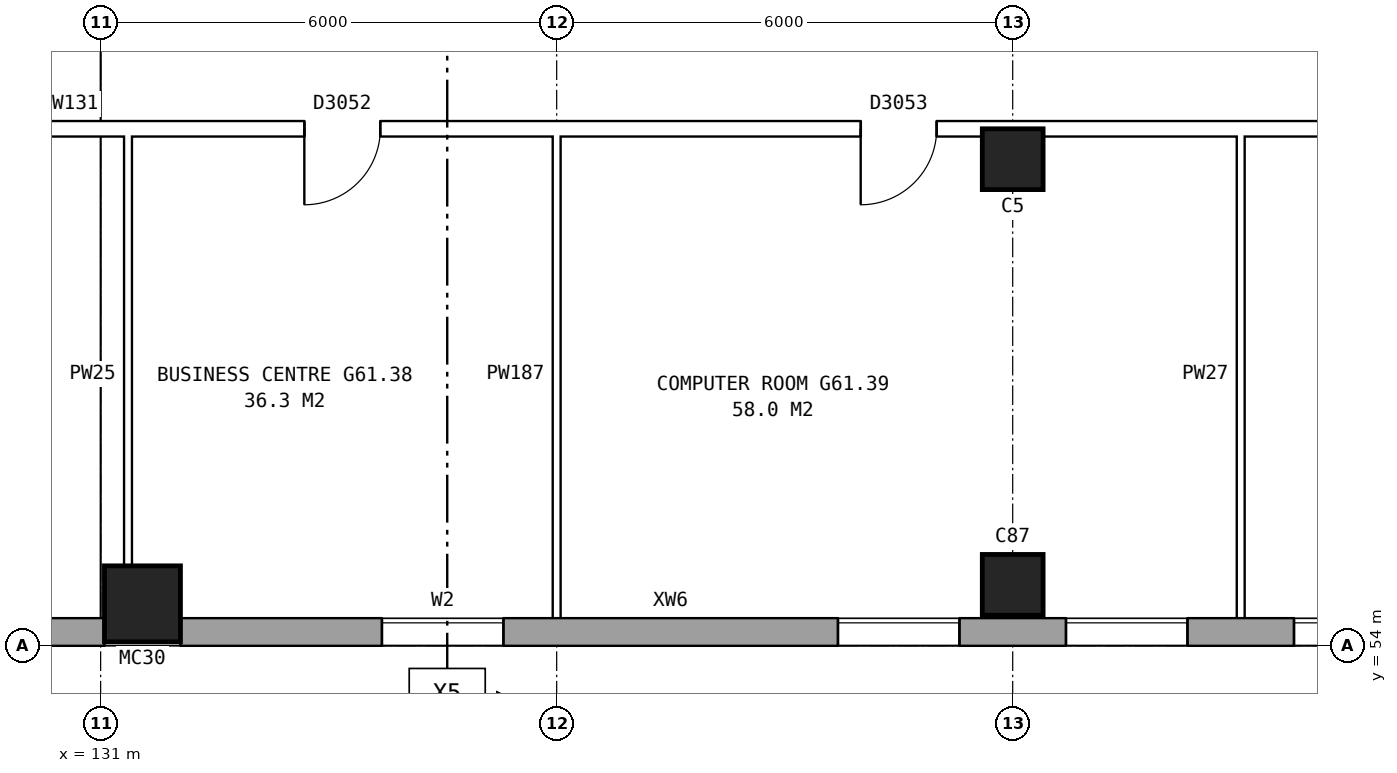
"""IFC4 building model, lengths in metres.
Left out: names, types, materials, properties, quantities, classifications, styles, units other than length and angle.
Written with IfcOpenShell. Run it as: python <this file> out.ifc"""

import sys

from ifc_helpers import new_model, si_unit, direction, frame, frame_2d, origin, origin_2d, place, context, subcontext, project, spatial, rectangle, hollow_rectangle, extrude, element, fill, save


model = new_model("IFC4")
c1 = context("Model", 3, precision=1e-05, world=origin(), true_north=direction((0.0, 1.0)))
c2 = subcontext(c1, "Body", "Model", "MODEL_VIEW")
j1 = project(units=[si_unit("LENGTHUNIT", "METRE"), si_unit("PLANEANGLEUNIT", "RADIAN")], contexts=[c1])
p1 = place(None, origin())
s1 = spatial("IfcSite", under=j1, at=p1, CompositionType="ELEMENT")
p2 = place(p1, origin())
s2 = spatial("IfcBuilding", under=s1, at=p2, CompositionType="ELEMENT")
p3 = place(p2, frame((0.0, 0.0, 215.2)))
s3 = spatial("IfcBuildingStorey", under=s2, at=p3, CompositionType="ELEMENT", Elevation=215.2)
for number, where, z_axis, x_axis in (
    (1, (143.0, 54.8, 0.0), (0.0, 0.0, 1.0), (1.0, 0.0, 0.0)),
    (2, (143.0, 60.4, 0.0), (0.0, 0.0, 1.0), (1.0, 0.0, 0.0)),
):
    element("IfcColumn", number, at=place(p3, frame(where, z_axis=z_axis, x_axis=x_axis)), inside=s3, PredefinedType="COLUMN", context=c2, shape_type="SweptSolid", body=[
        extrude(rectangle(XDim=0.8, YDim=0.8, at=origin_2d()), origin(), (0.0, 0.0, 1.0), 5.6),
    ])
p4 = place(p3, frame((131.55, 54.55, 0.0), z_axis=(0.0, 0.0, 1.0), x_axis=(1.0, 0.0, 0.0)))
e3 = element("IfcColumn", 3, at=p4, inside=s3, PredefinedType="COLUMN", context=c2, shape_type="SweptSolid", body=[
    extrude(hollow_rectangle(XDim=1.0, YDim=1.0, WallThickness=0.055, at=origin_2d()), origin(), (0.0, 0.0, 1.0), 6.2),
])
p5 = place(p3, frame((75.95, 54.18, 0.0), z_axis=(0.0, 0.0, 1.0), x_axis=(1.0, 0.0, 0.0)))
e4 = element("IfcWall", 4, at=p5, inside=s3, PredefinedType="STANDARD", context=c2, shape_type="SweptSolid", body=[
    extrude(rectangle(XDim=55.1, YDim=0.36, at=frame_2d((27.55, 0.0))), origin(), (0.0, 0.0, 1.0), 5.6),
])
p6 = place(p5, frame((0.969, 0.0, 0.15)))
e5 = element("IfcOpeningElement", 5, at=p6, cuts=e4, PredefinedType="OPENING", context=c2, shape_type="SweptSolid", body=[
    extrude(rectangle(XDim=1.6, YDim=2.4, at=frame_2d((0.8, 1.2))), frame((0.0, 0.19, 0.0), z_axis=(0.0, -1.0, 0.0), x_axis=(1.0, 0.0, 0.0)), (0.0, 0.0, 1.0), 0.38),
])
p7 = place(p5, frame((4.406, 0.0, 0.15)))
e6 = element("IfcOpeningElement", 6, at=p7, cuts=e4, PredefinedType="OPENING", context=c2, shape_type="SweptSolid", body=[
    extrude(rectangle(XDim=1.6, YDim=2.4, at=frame_2d((0.8, 1.2))), frame((0.0, 0.19, 0.0), z_axis=(0.0, -1.0, 0.0), x_axis=(1.0, 0.0, 0.0)), (0.0, 0.0, 1.0), 0.38),
])
p8 = place(p5, frame((7.844, 0.0, 0.15)))
e7 = element("IfcOpeningElement", 7, at=p8, cuts=e4, PredefinedType="OPENING", context=c2, shape_type="SweptSolid", body=[
    extrude(rectangle(XDim=1.6, YDim=2.4, at=frame_2d((0.8, 1.2))), frame((0.0, 0.19, 0.0), z_axis=(0.0, -1.0, 0.0), x_axis=(1.0, 0.0, 0.0)), (0.0, 0.0, 1.0), 0.38),
])
p9 = place(p5, frame((11.281, 0.0, 0.15)))
e8 = element("IfcOpeningElement", 8, at=p9, cuts=e4, PredefinedType="OPENING", context=c2, shape_type="SweptSolid", body=[
    extrude(rectangle(XDim=1.6, YDim=2.4, at=frame_2d((0.8, 1.2))), frame((0.0, 0.19, 0.0), z_axis=(0.0, -1.0, 0.0), x_axis=(1.0, 0.0, 0.0)), (0.0, 0.0, 1.0), 0.38),
])
p10 = place(p5, frame((14.719, 0.0, 0.15)))
e9 = element("IfcOpeningElement", 9, at=p10, cuts=e4, PredefinedType="OPENING", context=c2, shape_type="SweptSolid", body=[
    extrude(rectangle(XDim=1.6, YDim=2.4, at=frame_2d((0.8, 1.2))), frame((0.0, 0.19, 0.0), z_axis=(0.0, -1.0, 0.0), x_axis=(1.0, 0.0, 0.0)), (0.0, 0.0, 1.0), 0.38),
])
p11 = place(p5, frame((18.156, 0.0, 0.15)))
e10 = element("IfcOpeningElement", 10, at=p11, cuts=e4, PredefinedType="OPENING", context=c2, shape_type="SweptSolid", body=[
    extrude(rectangle(XDim=1.6, YDim=2.4, at=frame_2d((0.8, 1.2))), frame((0.0, 0.19, 0.0), z_axis=(0.0, -1.0, 0.0), x_axis=(1.0, 0.0, 0.0)), (0.0, 0.0, 1.0), 0.38),
])
p12 = place(p5, frame((21.594, 0.0, 0.15)))
e11 = element("IfcOpeningElement", 11, at=p12, cuts=e4, PredefinedType="OPENING", context=c2, shape_type="SweptSolid", body=[
    extrude(rectangle(XDim=1.6, YDim=2.4, at=frame_2d((0.8, 1.2))), frame((0.0, 0.19, 0.0), z_axis=(0.0, -1.0, 0.0), x_axis=(1.0, 0.0, 0.0)), (0.0, 0.0, 1.0), 0.38),
])
p13 = place(p5, frame((25.031, 0.0, 0.15)))
e12 = element("IfcOpeningElement", 12, at=p13, cuts=e4, PredefinedType="OPENING", context=c2, shape_type="SweptSolid", body=[
    extrude(rectangle(XDim=1.6, YDim=2.4, at=frame_2d((0.8, 1.2))), frame((0.0, 0.19, 0.0), z_axis=(0.0, -1.0, 0.0), x_axis=(1.0, 0.0, 0.0)), (0.0, 0.0, 1.0), 0.38),
])
p14 = place(p5, frame((28.469, 0.0, 0.15)))
e13 = element("IfcOpeningElement", 13, at=p14, cuts=e4, PredefinedType="OPENING", context=c2, shape_type="SweptSolid", body=[
    extrude(rectangle(XDim=1.6, YDim=2.4, at=frame_2d((0.8, 1.2))), frame((0.0, 0.19, 0.0), z_axis=(0.0, -1.0, 0.0), x_axis=(1.0, 0.0, 0.0)), (0.0, 0.0, 1.0), 0.38),
])
p15 = place(p5, frame((31.906, 0.0, 0.15)))
e14 = element("IfcOpeningElement", 14, at=p15, cuts=e4, PredefinedType="OPENING", context=c2, shape_type="SweptSolid", body=[
    extrude(rectangle(XDim=1.6, YDim=2.4, at=frame_2d((0.8, 1.2))), frame((0.0, 0.19, 0.0), z_axis=(0.0, -1.0, 0.0), x_axis=(1.0, 0.0, 0.0)), (0.0, 0.0, 1.0), 0.38),
])
p16 = place(p5, frame((35.344, 0.0, 0.15)))
e15 = element("IfcOpeningElement", 15, at=p16, cuts=e4, PredefinedType="OPENING", context=c2, shape_type="SweptSolid", body=[
    extrude(rectangle(XDim=1.6, YDim=2.4, at=frame_2d((0.8, 1.2))), frame((0.0, 0.19, 0.0), z_axis=(0.0, -1.0, 0.0), x_axis=(1.0, 0.0, 0.0)), (0.0, 0.0, 1.0), 0.38),
])
p17 = place(p5, frame((38.781, 0.0, 0.15)))
e16 = element("IfcOpeningElement", 16, at=p17, cuts=e4, PredefinedType="OPENING", context=c2, shape_type="SweptSolid", body=[
    extrude(rectangle(XDim=1.6, YDim=2.4, at=frame_2d((0.8, 1.2))), frame((0.0, 0.19, 0.0), z_axis=(0.0, -1.0, 0.0), x_axis=(1.0, 0.0, 0.0)), (0.0, 0.0, 1.0), 0.38),
])
p18 = place(p5, frame((42.219, 0.0, 0.15)))
e17 = element("IfcOpeningElement", 17, at=p18, cuts=e4, PredefinedType="OPENING", context=c2, shape_type="SweptSolid", body=[
    extrude(rectangle(XDim=1.6, YDim=2.4, at=frame_2d((0.8, 1.2))), frame((0.0, 0.19, 0.0), z_axis=(0.0, -1.0, 0.0), x_axis=(1.0, 0.0, 0.0)), (0.0, 0.0, 1.0), 0.38),
])
p19 = place(p5, frame((45.656, 0.0, 0.15)))
e18 = element("IfcOpeningElement", 18, at=p19, cuts=e4, PredefinedType="OPENING", context=c2, shape_type="SweptSolid", body=[
    extrude(rectangle(XDim=1.6, YDim=2.4, at=frame_2d((0.8, 1.2))), frame((0.0, 0.19, 0.0), z_axis=(0.0, -1.0, 0.0), x_axis=(1.0, 0.0, 0.0)), (0.0, 0.0, 1.0), 0.38),
])
p20 = place(p5, frame((49.094, 0.0, 0.15)))
e19 = element("IfcOpeningElement", 19, at=p20, cuts=e4, PredefinedType="OPENING", context=c2, shape_type="SweptSolid", body=[
    extrude(rectangle(XDim=1.6, YDim=2.4, at=frame_2d((0.8, 1.2))), frame((0.0, 0.19, 0.0), z_axis=(0.0, -1.0, 0.0), x_axis=(1.0, 0.0, 0.0)), (0.0, 0.0, 1.0), 0.38),
])
p21 = place(p5, frame((52.531, 0.0, 0.15)))
e20 = element("IfcOpeningElement", 20, at=p21, cuts=e4, PredefinedType="OPENING", context=c2, shape_type="SweptSolid", body=[
    extrude(rectangle(XDim=1.6, YDim=2.4, at=frame_2d((0.8, 1.2))), frame((0.0, 0.19, 0.0), z_axis=(0.0, -1.0, 0.0), x_axis=(1.0, 0.0, 0.0)), (0.0, 0.0, 1.0), 0.38),
])
p22 = place(p3, frame((132.05, 54.18, 0.0), z_axis=(0.0, 0.0, 1.0), x_axis=(1.0, 0.0, 0.0)))
e21 = element("IfcWall", 21, at=p22, inside=s3, PredefinedType="STANDARD", context=c2, shape_type="SweptSolid", body=[
    extrude(rectangle(XDim=33.875, YDim=0.36, at=frame_2d((16.938, 0.0))), origin(), (0.0, 0.0, 1.0), 5.6),
])
p23 = place(p22, frame((2.65, 0.0, 0.15)))
e22 = element("IfcOpeningElement", 22, at=p23, cuts=e21, PredefinedType="OPENING", context=c2, shape_type="SweptSolid", body=[
    extrude(rectangle(XDim=1.6, YDim=2.4, at=frame_2d((0.8, 1.2))), frame((0.0, 0.19, 0.0), z_axis=(0.0, -1.0, 0.0), x_axis=(1.0, 0.0, 0.0)), (0.0, 0.0, 1.0), 0.38),
])
p24 = place(p22, frame((8.65, 0.0, 0.15)))
e23 = element("IfcOpeningElement", 23, at=p24, cuts=e21, PredefinedType="OPENING", context=c2, shape_type="SweptSolid", body=[
    extrude(rectangle(XDim=1.6, YDim=2.4, at=frame_2d((0.8, 1.2))), frame((0.0, 0.19, 0.0), z_axis=(0.0, -1.0, 0.0), x_axis=(1.0, 0.0, 0.0)), (0.0, 0.0, 1.0), 0.38),
])
p25 = place(p22, frame((11.65, 0.0, 0.15)))
e24 = element("IfcOpeningElement", 24, at=p25, cuts=e21, PredefinedType="OPENING", context=c2, shape_type="SweptSolid", body=[
    extrude(rectangle(XDim=1.6, YDim=2.4, at=frame_2d((0.8, 1.2))), frame((0.0, 0.19, 0.0), z_axis=(0.0, -1.0, 0.0), x_axis=(1.0, 0.0, 0.0)), (0.0, 0.0, 1.0), 0.38),
])
p26 = place(p22, frame((14.65, 0.0, 0.15)))
e25 = element("IfcOpeningElement", 25, at=p26, cuts=e21, PredefinedType="OPENING", context=c2, shape_type="SweptSolid", body=[
    extrude(rectangle(XDim=1.6, YDim=2.4, at=frame_2d((0.8, 1.2))), frame((0.0, 0.19, 0.0), z_axis=(0.0, -1.0, 0.0), x_axis=(1.0, 0.0, 0.0)), (0.0, 0.0, 1.0), 0.38),
])
p27 = place(p22, frame((17.65, 0.0, 0.15)))
e26 = element("IfcOpeningElement", 26, at=p27, cuts=e21, PredefinedType="OPENING", context=c2, shape_type="SweptSolid", body=[
    extrude(rectangle(XDim=1.6, YDim=2.4, at=frame_2d((0.8, 1.2))), frame((0.0, 0.19, 0.0), z_axis=(0.0, -1.0, 0.0), x_axis=(1.0, 0.0, 0.0)), (0.0, 0.0, 1.0), 0.38),
])
p28 = place(p22, frame((20.65, 0.0, 0.15)))
e27 = element("IfcOpeningElement", 27, at=p28, cuts=e21, PredefinedType="OPENING", context=c2, shape_type="SweptSolid", body=[
    extrude(rectangle(XDim=1.6, YDim=2.4, at=frame_2d((0.8, 1.2))), frame((0.0, 0.19, 0.0), z_axis=(0.0, -1.0, 0.0), x_axis=(1.0, 0.0, 0.0)), (0.0, 0.0, 1.0), 0.38),
])
p29 = place(p22, frame((23.65, 0.0, 0.15)))
e28 = element("IfcOpeningElement", 28, at=p29, cuts=e21, PredefinedType="OPENING", context=c2, shape_type="SweptSolid", body=[
    extrude(rectangle(XDim=1.6, YDim=2.4, at=frame_2d((0.8, 1.2))), frame((0.0, 0.19, 0.0), z_axis=(0.0, -1.0, 0.0), x_axis=(1.0, 0.0, 0.0)), (0.0, 0.0, 1.0), 0.38),
])
p30 = place(p22, frame((25.55, 0.0, 0.15)))
e29 = element("IfcOpeningElement", 29, at=p30, cuts=e21, PredefinedType="OPENING", context=c2, shape_type="SweptSolid", body=[
    extrude(rectangle(XDim=0.9, YDim=2.4, at=frame_2d((0.45, 1.2))), frame((0.0, 0.19, 0.0), z_axis=(0.0, -1.0, 0.0), x_axis=(1.0, 0.0, 0.0)), (0.0, 0.0, 1.0), 0.38),
])
p31 = place(p22, frame((30.1, 0.0, 0.15)))
e30 = element("IfcOpeningElement", 30, at=p31, cuts=e21, PredefinedType="OPENING", context=c2, shape_type="SweptSolid", body=[
    extrude(rectangle(XDim=0.9, YDim=2.4, at=frame_2d((0.45, 1.2))), frame((0.0, 0.19, 0.0), z_axis=(0.0, -1.0, 0.0), x_axis=(1.0, 0.0, 0.0)), (0.0, 0.0, 1.0), 0.38),
])
p32 = place(p22, frame((26.75, 0.0, 0.15)))
e31 = element("IfcOpeningElement", 31, at=p32, cuts=e21, PredefinedType="OPENING", context=c2, shape_type="SweptSolid", body=[
    extrude(rectangle(XDim=0.9, YDim=2.4, at=frame_2d((0.45, 1.2))), frame((0.0, 0.19, 0.0), z_axis=(0.0, -1.0, 0.0), x_axis=(1.0, 0.0, 0.0)), (0.0, 0.0, 1.0), 0.38),
])
p33 = place(p22, frame((31.3, 0.0, 0.15)))
e32 = element("IfcOpeningElement", 32, at=p33, cuts=e21, PredefinedType="OPENING", context=c2, shape_type="SweptSolid", body=[
    extrude(rectangle(XDim=0.9, YDim=2.4, at=frame_2d((0.45, 1.2))), frame((0.0, 0.19, 0.0), z_axis=(0.0, -1.0, 0.0), x_axis=(1.0, 0.0, 0.0)), (0.0, 0.0, 1.0), 0.38),
])
p34 = place(p3, frame((32.24, 60.8, 0.0), z_axis=(0.0, 0.0, 1.0), x_axis=(1.0, 0.0, 0.0)))
e33 = element("IfcWall", 33, at=p34, inside=s3, PredefinedType="PARTITIONING", context=c2, shape_type="SweptSolid", body=[
    extrude(rectangle(XDim=136.52, YDim=0.2, at=frame_2d((68.26, 0.0))), origin(), (0.0, 0.0, 1.0), 5.6),
])
p35 = place(p34, frame((3.44, 0.0, 0.0)))
e34 = element("IfcOpeningElement", 34, at=p35, cuts=e33, PredefinedType="OPENING", context=c2, shape_type="SweptSolid", body=[
    extrude(rectangle(XDim=1.0, YDim=2.1, at=frame_2d((0.5, 1.05))), frame((0.0, 0.11, 0.0), z_axis=(0.0, -1.0, 0.0), x_axis=(1.0, 0.0, 0.0)), (0.0, 0.0, 1.0), 0.22),
])
p36 = place(p34, frame((11.76, 0.0, 0.0)))
e35 = element("IfcOpeningElement", 35, at=p36, cuts=e33, PredefinedType="OPENING", context=c2, shape_type="SweptSolid", body=[
    extrude(rectangle(XDim=1.0, YDim=2.1, at=frame_2d((0.5, 1.05))), frame((0.0, 0.11, 0.0), z_axis=(0.0, -1.0, 0.0), x_axis=(1.0, 0.0, 0.0)), (0.0, 0.0, 1.0), 0.22),
])
p37 = place(p34, frame((20.76, 0.0, 0.0)))
e36 = element("IfcOpeningElement", 36, at=p37, cuts=e33, PredefinedType="OPENING", context=c2, shape_type="SweptSolid", body=[
    extrude(rectangle(XDim=1.0, YDim=2.1, at=frame_2d((0.5, 1.05))), frame((0.0, 0.11, 0.0), z_axis=(0.0, -1.0, 0.0), x_axis=(1.0, 0.0, 0.0)), (0.0, 0.0, 1.0), 0.22),
])
p38 = place(p34, frame((29.76, 0.0, 0.0)))
e37 = element("IfcOpeningElement", 37, at=p38, cuts=e33, PredefinedType="OPENING", context=c2, shape_type="SweptSolid", body=[
    extrude(rectangle(XDim=1.0, YDim=2.1, at=frame_2d((0.5, 1.05))), frame((0.0, 0.11, 0.0), z_axis=(0.0, -1.0, 0.0), x_axis=(1.0, 0.0, 0.0)), (0.0, 0.0, 1.0), 0.22),
])
p39 = place(p34, frame((38.58, 0.0, 0.0)))
e38 = element("IfcOpeningElement", 38, at=p39, cuts=e33, PredefinedType="OPENING", context=c2, shape_type="SweptSolid", body=[
    extrude(rectangle(XDim=1.0, YDim=2.1, at=frame_2d((0.5, 1.05))), frame((0.0, 0.11, 0.0), z_axis=(0.0, -1.0, 0.0), x_axis=(1.0, 0.0, 0.0)), (0.0, 0.0, 1.0), 0.22),
])
p40 = place(p34, frame((49.955, 0.0, 0.0)))
e39 = element("IfcOpeningElement", 39, at=p40, cuts=e33, PredefinedType="OPENING", context=c2, shape_type="SweptSolid", body=[
    extrude(rectangle(XDim=1.0, YDim=2.1, at=frame_2d((0.5, 1.05))), frame((0.0, 0.11, 0.0), z_axis=(0.0, -1.0, 0.0), x_axis=(1.0, 0.0, 0.0)), (0.0, 0.0, 1.0), 0.22),
])
p41 = place(p34, frame((63.885, 0.0, 0.0)))
e40 = element("IfcOpeningElement", 40, at=p41, cuts=e33, PredefinedType="OPENING", context=c2, shape_type="SweptSolid", body=[
    extrude(rectangle(XDim=1.0, YDim=2.1, at=frame_2d((0.5, 1.05))), frame((0.0, 0.11, 0.0), z_axis=(0.0, -1.0, 0.0), x_axis=(1.0, 0.0, 0.0)), (0.0, 0.0, 1.0), 0.22),
])
p42 = place(p34, frame((77.635, 0.0, 0.0)))
e41 = element("IfcOpeningElement", 41, at=p42, cuts=e33, PredefinedType="OPENING", context=c2, shape_type="SweptSolid", body=[
    extrude(rectangle(XDim=1.0, YDim=2.1, at=frame_2d((0.5, 1.05))), frame((0.0, 0.11, 0.0), z_axis=(0.0, -1.0, 0.0), x_axis=(1.0, 0.0, 0.0)), (0.0, 0.0, 1.0), 0.22),
])
p43 = place(p34, frame((91.565, 0.0, 0.0)))
e42 = element("IfcOpeningElement", 42, at=p43, cuts=e33, PredefinedType="OPENING", context=c2, shape_type="SweptSolid", body=[
    extrude(rectangle(XDim=1.0, YDim=2.1, at=frame_2d((0.5, 1.05))), frame((0.0, 0.11, 0.0), z_axis=(0.0, -1.0, 0.0), x_axis=(1.0, 0.0, 0.0)), (0.0, 0.0, 1.0), 0.22),
])
p44 = place(p34, frame((101.44, 0.0, 0.0)))
e43 = element("IfcOpeningElement", 43, at=p44, cuts=e33, PredefinedType="OPENING", context=c2, shape_type="SweptSolid", body=[
    extrude(rectangle(XDim=1.0, YDim=2.1, at=frame_2d((0.5, 1.05))), frame((0.0, 0.11, 0.0), z_axis=(0.0, -1.0, 0.0), x_axis=(1.0, 0.0, 0.0)), (0.0, 0.0, 1.0), 0.22),
])
p45 = place(p34, frame((108.76, 0.0, 0.0)))
e44 = element("IfcOpeningElement", 44, at=p45, cuts=e33, PredefinedType="OPENING", context=c2, shape_type="SweptSolid", body=[
    extrude(rectangle(XDim=1.0, YDim=2.1, at=frame_2d((0.5, 1.05))), frame((0.0, 0.11, 0.0), z_axis=(0.0, -1.0, 0.0), x_axis=(1.0, 0.0, 0.0)), (0.0, 0.0, 1.0), 0.22),
])
p46 = place(p34, frame((117.76, 0.0, 0.0)))
e45 = element("IfcOpeningElement", 45, at=p46, cuts=e33, PredefinedType="OPENING", context=c2, shape_type="SweptSolid", body=[
    extrude(rectangle(XDim=1.0, YDim=2.1, at=frame_2d((0.5, 1.05))), frame((0.0, 0.11, 0.0), z_axis=(0.0, -1.0, 0.0), x_axis=(1.0, 0.0, 0.0)), (0.0, 0.0, 1.0), 0.22),
])
p47 = place(p34, frame((125.26, 0.0, 0.0)))
e46 = element("IfcOpeningElement", 46, at=p47, cuts=e33, PredefinedType="OPENING", context=c2, shape_type="SweptSolid", body=[
    extrude(rectangle(XDim=1.0, YDim=2.1, at=frame_2d((0.5, 1.05))), frame((0.0, 0.11, 0.0), z_axis=(0.0, -1.0, 0.0), x_axis=(1.0, 0.0, 0.0)), (0.0, 0.0, 1.0), 0.22),
])
p48 = place(p34, frame((132.08, 0.0, 0.0)))
e47 = element("IfcOpeningElement", 47, at=p48, cuts=e33, PredefinedType="OPENING", context=c2, shape_type="SweptSolid", body=[
    extrude(rectangle(XDim=1.0, YDim=2.1, at=frame_2d((0.5, 1.05))), frame((0.0, 0.11, 0.0), z_axis=(0.0, -1.0, 0.0), x_axis=(1.0, 0.0, 0.0)), (0.0, 0.0, 1.0), 0.22),
])
for number, where, z_axis, x_axis in (
    (48, (131.36, 54.24, 0.0), (0.0, 0.0, 1.0), (0.0, 1.0, 0.0)),
    (49, (137.0, 54.24, 0.0), (0.0, 0.0, 1.0), (0.0, 1.0, 0.0)),
    (50, (146.0, 54.24, 0.0), (0.0, 0.0, 1.0), (0.0, 1.0, 0.0)),
):
    element("IfcWall", number, at=place(p3, frame(where, z_axis=z_axis, x_axis=x_axis)), inside=s3, PredefinedType="PARTITIONING", context=c2, shape_type="SweptSolid", body=[
        extrude(rectangle(XDim=6.66, YDim=0.1, at=frame_2d((3.33, 0.0))), origin(), (0.0, 0.0, 1.0), 5.6),
    ])
p49 = place(p23, origin())
e51 = element("IfcWindow", 51, at=p49, inside=s3, PartitioningType="SINGLE_PANEL", PredefinedType="WINDOW", context=c2, shape_type="SweptSolid", body=[
    extrude(rectangle(XDim=1.6, YDim=2.4, at=frame_2d((0.8, 1.2))), frame((0.0, 0.15, 0.0), z_axis=(0.0, -1.0, 0.0), x_axis=(1.0, 0.0, 0.0)), (0.0, 0.0, 1.0), 0.06),
])
fill(e22, e51)
p50 = place(p24, origin())
e52 = element("IfcWindow", 52, at=p50, inside=s3, PartitioningType="SINGLE_PANEL", PredefinedType="WINDOW", context=c2, shape_type="SweptSolid", body=[
    extrude(rectangle(XDim=1.6, YDim=2.4, at=frame_2d((0.8, 1.2))), frame((0.0, 0.15, 0.0), z_axis=(0.0, -1.0, 0.0), x_axis=(1.0, 0.0, 0.0)), (0.0, 0.0, 1.0), 0.06),
])
fill(e23, e52)
p51 = place(p25, origin())
e53 = element("IfcWindow", 53, at=p51, inside=s3, PartitioningType="SINGLE_PANEL", PredefinedType="WINDOW", context=c2, shape_type="SweptSolid", body=[
    extrude(rectangle(XDim=1.6, YDim=2.4, at=frame_2d((0.8, 1.2))), frame((0.0, 0.15, 0.0), z_axis=(0.0, -1.0, 0.0), x_axis=(1.0, 0.0, 0.0)), (0.0, 0.0, 1.0), 0.06),
])
fill(e24, e53)
p52 = place(p26, origin())
e54 = element("IfcWindow", 54, at=p52, inside=s3, PartitioningType="SINGLE_PANEL", PredefinedType="WINDOW", context=c2, shape_type="SweptSolid", body=[
    extrude(rectangle(XDim=1.6, YDim=2.4, at=frame_2d((0.8, 1.2))), frame((0.0, 0.15, 0.0), z_axis=(0.0, -1.0, 0.0), x_axis=(1.0, 0.0, 0.0)), (0.0, 0.0, 1.0), 0.06),
])
fill(e25, e54)
p53 = place(p44, frame((1.0, 0.0, 0.0), z_axis=(0.0, 0.0, 1.0), x_axis=(-1.0, 0.0, 0.0)))
e55 = element("IfcDoor", 55, at=p53, inside=s3, OperationType="SINGLE_SWING_RIGHT", PredefinedType="DOOR", context=c2, shape_type="SweptSolid", body=[
    extrude(rectangle(XDim=1.0, YDim=2.1, at=frame_2d((0.5, 1.05))), frame((0.0, 0.025, 0.0), z_axis=(0.0, -1.0, 0.0), x_axis=(1.0, 0.0, 0.0)), (0.0, 0.0, 1.0), 0.05),
])
fill(e43, e55)
p54 = place(p45, frame((1.0, 0.0, 0.0), z_axis=(0.0, 0.0, 1.0), x_axis=(-1.0, 0.0, 0.0)))
e56 = element("IfcDoor", 56, at=p54, inside=s3, OperationType="SINGLE_SWING_RIGHT", PredefinedType="DOOR", context=c2, shape_type="SweptSolid", body=[
    extrude(rectangle(XDim=1.0, YDim=2.1, at=frame_2d((0.5, 1.05))), frame((0.0, 0.025, 0.0), z_axis=(0.0, -1.0, 0.0), x_axis=(1.0, 0.0, 0.0)), (0.0, 0.0, 1.0), 0.05),
])
fill(e44, e56)
save(model, sys.argv[1])
